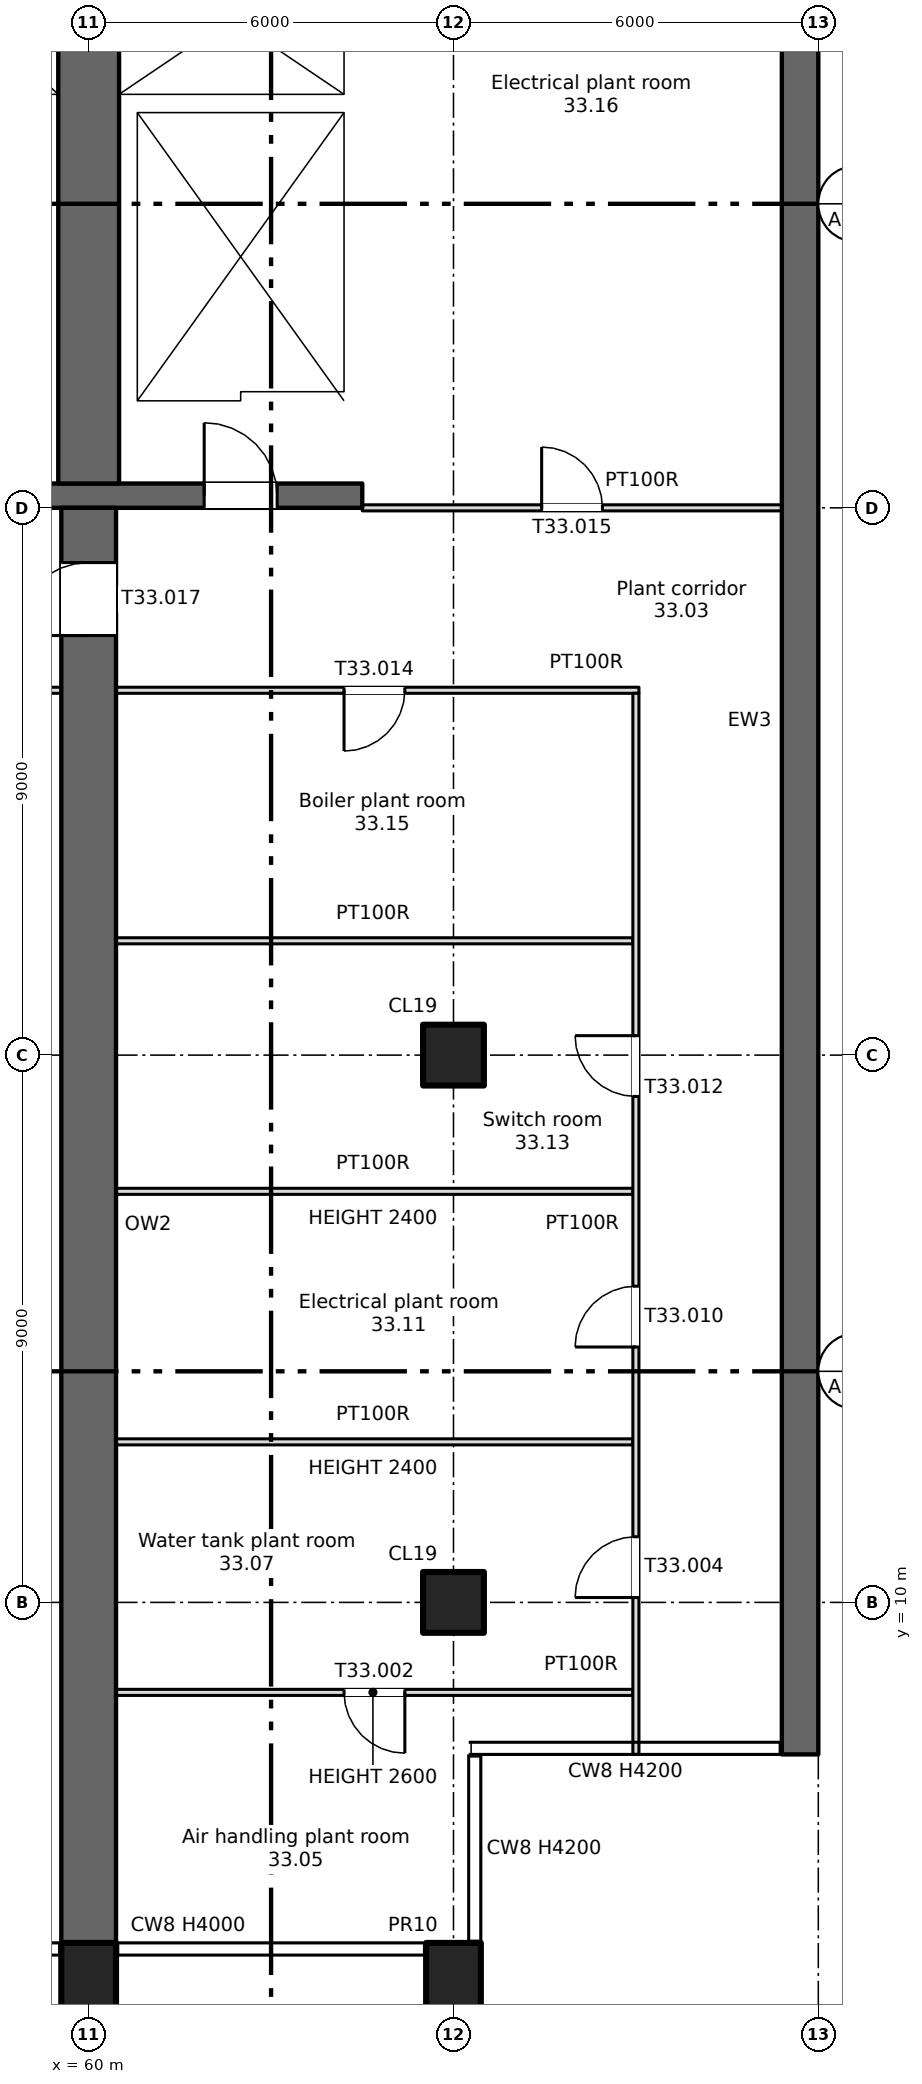
"""IFC4 building model, lengths in metres.
Left out: names, types, materials, properties, quantities, classifications, styles, units other than length and angle.
Written with IfcOpenShell. Run it as: python <this file> out.ifc"""

import sys

from ifc_helpers import new_model, si_unit, direction, frame, frame_2d, origin, origin_2d, place, context, subcontext, project, spatial, rectangle, extrude, element, fill, save


model = new_model("IFC4")
c1 = context("Model", 3, precision=1e-05, world=origin(), true_north=direction((0.0, 1.0)))
c2 = subcontext(c1, "Body", "Model", "MODEL_VIEW")
j1 = project(units=[si_unit("LENGTHUNIT", "METRE"), si_unit("PLANEANGLEUNIT", "RADIAN")], contexts=[c1])
p1 = place(None, origin())
s1 = spatial("IfcSite", under=j1, at=p1, CompositionType="ELEMENT")
p2 = place(p1, origin())
s2 = spatial("IfcBuilding", under=s1, at=p2, CompositionType="ELEMENT")
p3 = place(p2, frame((0.0, 0.0, 226.75)))
s3 = spatial("IfcBuildingStorey", under=s2, at=p3, CompositionType="ELEMENT", Elevation=226.75)
for number, where, z_axis, x_axis in (
    (1, (60.0, 3.7, -0.6), (0.0, 0.0, 1.0), (1.0, 0.0, 0.0)),
    (2, (66.0, 3.7, -0.6), (0.0, 0.0, 1.0), (1.0, 0.0, 0.0)),
):
    element("IfcColumn", number, at=place(p3, frame(where, z_axis=z_axis, x_axis=x_axis)), inside=s3, PredefinedType="COLUMN", context=c2, shape_type="SweptSolid", body=[
        extrude(rectangle(XDim=0.9, YDim=1.4, at=origin_2d()), origin(), (0.0, 0.0, 1.0), 4.8),
    ])
for number, where, z_axis, x_axis in (
    (3, (66.0, 10.0, 0.0), (0.0, 0.0, 1.0), (1.0, 0.0, 0.0)),
    (4, (66.0, 19.0, 0.0), (0.0, 0.0, 1.0), (1.0, 0.0, 0.0)),
):
    element("IfcColumn", number, at=place(p3, frame(where, z_axis=z_axis, x_axis=x_axis)), inside=s3, PredefinedType="COLUMN", context=c2, shape_type="SweptSolid", body=[
        extrude(rectangle(XDim=1.0, YDim=1.0, at=origin_2d()), origin(), (0.0, 0.0, 1.0), 4.2),
    ])
p4 = place(p3, frame((71.7, 7.5, 0.0), z_axis=(0.0, 0.0, 1.0), x_axis=(0.0, 1.0, 0.0)))
e5 = element("IfcWall", 5, at=p4, inside=s3, PredefinedType="SHEAR", context=c2, shape_type="SweptSolid", body=[
    extrude(rectangle(XDim=34.0, YDim=0.6, at=frame_2d((17.0, 0.0))), origin(), (0.0, 0.0, 1.0), 4.2),
])
p5 = place(p3, frame((60.0, 4.4, 0.0), z_axis=(0.0, 0.0, 1.0), x_axis=(0.0, 1.0, 0.0)))
e6 = element("IfcWall", 6, at=p5, inside=s3, PredefinedType="SHEAR", context=c2, shape_type="SweptSolid", body=[
    extrude(rectangle(XDim=23.6, YDim=0.9, at=frame_2d((11.8, 0.0))), origin(), (0.0, 0.0, 1.0), 4.2),
])
p6 = place(p5, frame((21.5, 0.0, 0.0)))
e7 = element("IfcOpeningElement", 7, at=p6, cuts=e6, PredefinedType="OPENING", context=c2, shape_type="SweptSolid", body=[
    extrude(rectangle(XDim=1.2, YDim=2.1, at=frame_2d((0.6, 1.05))), frame((0.0, 0.46, 0.0), z_axis=(0.0, -1.0, 0.0), x_axis=(1.0, 0.0, 0.0)), (0.0, 0.0, 1.0), 0.92),
])
p7 = place(p3, frame((6.6, 28.2, 0.0), z_axis=(0.0, 0.0, 1.0), x_axis=(1.0, 0.0, 0.0)))
e8 = element("IfcWall", 8, at=p7, inside=s3, PredefinedType="SHEAR", context=c2, shape_type="SweptSolid", body=[
    extrude(rectangle(XDim=57.9, YDim=0.4, at=frame_2d((28.95, 0.0))), origin(), (0.0, 0.0, 1.0), 4.2),
])
p8 = place(p7, frame((13.95, 0.0, 0.0)))
e9 = element("IfcOpeningElement", 9, at=p8, cuts=e8, PredefinedType="OPENING", context=c2, shape_type="SweptSolid", body=[
    extrude(rectangle(XDim=0.9, YDim=2.1, at=frame_2d((0.45, 1.05))), frame((0.0, 0.21, 0.0), z_axis=(0.0, -1.0, 0.0), x_axis=(1.0, 0.0, 0.0)), (0.0, 0.0, 1.0), 0.42),
])
p9 = place(p7, frame((49.95, 0.0, 0.0)))
e10 = element("IfcOpeningElement", 10, at=p9, cuts=e8, PredefinedType="OPENING", context=c2, shape_type="SweptSolid", body=[
    extrude(rectangle(XDim=0.9, YDim=2.1, at=frame_2d((0.45, 1.05))), frame((0.0, 0.21, 0.0), z_axis=(0.0, -1.0, 0.0), x_axis=(1.0, 0.0, 0.0)), (0.0, 0.0, 1.0), 0.42),
])
p10 = place(p7, frame((1.45, 0.0, 0.0)))
e11 = element("IfcOpeningElement", 11, at=p10, cuts=e8, PredefinedType="OPENING", context=c2, shape_type="SweptSolid", body=[
    extrude(rectangle(XDim=0.9, YDim=2.1, at=frame_2d((0.45, 1.05))), frame((0.0, 0.21, 0.0), z_axis=(0.0, -1.0, 0.0), x_axis=(1.0, 0.0, 0.0)), (0.0, 0.0, 1.0), 0.42),
])
p11 = place(p7, frame((4.8, 0.0, 0.0)))
e12 = element("IfcOpeningElement", 12, at=p11, cuts=e8, PredefinedType="OPENING", context=c2, shape_type="SweptSolid", body=[
    extrude(rectangle(XDim=1.2, YDim=2.1, at=frame_2d((0.6, 1.05))), frame((0.0, 0.21, 0.0), z_axis=(0.0, -1.0, 0.0), x_axis=(1.0, 0.0, 0.0)), (0.0, 0.0, 1.0), 0.42),
])
p12 = place(p7, frame((31.8, 0.0, 0.0)))
e13 = element("IfcOpeningElement", 13, at=p12, cuts=e8, PredefinedType="OPENING", context=c2, shape_type="SweptSolid", body=[
    extrude(rectangle(XDim=1.2, YDim=2.1, at=frame_2d((0.6, 1.05))), frame((0.0, 0.21, 0.0), z_axis=(0.0, -1.0, 0.0), x_axis=(1.0, 0.0, 0.0)), (0.0, 0.0, 1.0), 0.42),
])
p13 = place(p7, frame((55.3, 0.0, 0.0)))
e14 = element("IfcOpeningElement", 14, at=p13, cuts=e8, PredefinedType="OPENING", context=c2, shape_type="SweptSolid", body=[
    extrude(rectangle(XDim=1.2, YDim=2.1, at=frame_2d((0.6, 1.05))), frame((0.0, 0.21, 0.0), z_axis=(0.0, -1.0, 0.0), x_axis=(1.0, 0.0, 0.0)), (0.0, 0.0, 1.0), 0.42),
])
p14 = place(p7, frame((21.8, 0.0, 0.0)))
e15 = element("IfcOpeningElement", 15, at=p14, cuts=e8, PredefinedType="OPENING", context=c2, shape_type="SweptSolid", body=[
    extrude(rectangle(XDim=1.2, YDim=2.1, at=frame_2d((0.6, 1.05))), frame((0.0, 0.21, 0.0), z_axis=(0.0, -1.0, 0.0), x_axis=(1.0, 0.0, 0.0)), (0.0, 0.0, 1.0), 0.42),
])
p15 = place(p7, frame((41.8, 0.0, 0.0)))
e16 = element("IfcOpeningElement", 16, at=p15, cuts=e8, PredefinedType="OPENING", context=c2, shape_type="SweptSolid", body=[
    extrude(rectangle(XDim=1.2, YDim=2.1, at=frame_2d((0.6, 1.05))), frame((0.0, 0.21, 0.0), z_axis=(0.0, -1.0, 0.0), x_axis=(1.0, 0.0, 0.0)), (0.0, 0.0, 1.0), 0.42),
])
p16 = place(p7, frame((24.95, 0.0, 0.0)))
e17 = element("IfcOpeningElement", 17, at=p16, cuts=e8, PredefinedType="OPENING", context=c2, shape_type="SweptSolid", body=[
    extrude(rectangle(XDim=2.4, YDim=2.1, at=frame_2d((1.2, 1.05))), frame((0.0, 0.21, 0.0), z_axis=(0.0, -1.0, 0.0), x_axis=(1.0, 0.0, 0.0)), (0.0, 0.0, 1.0), 0.42),
])
p17 = place(p7, frame((37.45, 0.0, 0.0)))
e18 = element("IfcOpeningElement", 18, at=p17, cuts=e8, PredefinedType="OPENING", context=c2, shape_type="SweptSolid", body=[
    extrude(rectangle(XDim=2.4, YDim=2.1, at=frame_2d((1.2, 1.05))), frame((0.0, 0.21, 0.0), z_axis=(0.0, -1.0, 0.0), x_axis=(1.0, 0.0, 0.0)), (0.0, 0.0, 1.0), 0.42),
])
p18 = place(p7, frame((7.95, 0.0, 0.0)))
e19 = element("IfcOpeningElement", 19, at=p18, cuts=e8, PredefinedType="OPENING", context=c2, shape_type="SweptSolid", body=[
    extrude(rectangle(XDim=2.4, YDim=2.1, at=frame_2d((1.2, 1.05))), frame((0.0, 0.21, 0.0), z_axis=(0.0, -1.0, 0.0), x_axis=(1.0, 0.0, 0.0)), (0.0, 0.0, 1.0), 0.42),
])
p19 = place(p7, frame((28.95, 0.0, 0.0)))
e20 = element("IfcOpeningElement", 20, at=p19, cuts=e8, PredefinedType="OPENING", context=c2, shape_type="SweptSolid", body=[
    extrude(rectangle(XDim=0.9, YDim=2.1, at=frame_2d((0.45, 1.05))), frame((0.0, 0.21, 0.0), z_axis=(0.0, -1.0, 0.0), x_axis=(1.0, 0.0, 0.0)), (0.0, 0.0, 1.0), 0.42),
])
p20 = place(p7, frame((34.95, 0.0, 0.0)))
e21 = element("IfcOpeningElement", 21, at=p20, cuts=e8, PredefinedType="OPENING", context=c2, shape_type="SweptSolid", body=[
    extrude(rectangle(XDim=0.9, YDim=2.1, at=frame_2d((0.45, 1.05))), frame((0.0, 0.21, 0.0), z_axis=(0.0, -1.0, 0.0), x_axis=(1.0, 0.0, 0.0)), (0.0, 0.0, 1.0), 0.42),
])
p21 = place(p3, frame((64.35, 34.8, 0.0), z_axis=(0.0, 0.0, 1.0), x_axis=(0.0, 1.0, 0.0)))
e22 = element("IfcWall", 22, at=p21, inside=s3, PredefinedType="SHEAR", context=c2, shape_type="SweptSolid", body=[
    extrude(rectangle(XDim=10.5, YDim=0.3, at=frame_2d((5.25, 0.0))), origin(), (0.0, 0.0, 1.0), 4.2),
])
p22 = place(p3, frame((60.0, 28.4, 0.0), z_axis=(0.0, 0.0, 1.0), x_axis=(0.0, 1.0, 0.0)))
e23 = element("IfcWall", 23, at=p22, inside=s3, PredefinedType="SHEAR", context=c2, shape_type="SweptSolid", body=[
    extrude(rectangle(XDim=16.9, YDim=1.0, at=frame_2d((8.45, 0.0))), origin(), (0.0, 0.0, 1.0), 4.2),
])
p23 = place(p22, frame((9.6, 0.0, 0.0)))
e24 = element("IfcOpeningElement", 24, at=p23, cuts=e23, PredefinedType="OPENING", context=c2, shape_type="SweptSolid", body=[
    extrude(rectangle(XDim=2.0, YDim=2.1, at=frame_2d((1.0, 1.05))), frame((0.0, 0.51, 0.0), z_axis=(0.0, -1.0, 0.0), x_axis=(1.0, 0.0, 0.0)), (0.0, 0.0, 1.0), 1.02),
])
p24 = place(p22, frame((15.4, 0.0, 0.0)))
e25 = element("IfcOpeningElement", 25, at=p24, cuts=e23, PredefinedType="OPENING", context=c2, shape_type="SweptSolid", body=[
    extrude(rectangle(XDim=1.2, YDim=2.1, at=frame_2d((0.6, 1.05))), frame((0.0, 0.51, 0.0), z_axis=(0.0, -1.0, 0.0), x_axis=(1.0, 0.0, 0.0)), (0.0, 0.0, 1.0), 1.02),
])
for number, where, z_axis, x_axis in (
    (26, (60.65, 28.4, 0.0), (0.0, 0.0, 1.0), (0.0, 1.0, 0.0)),
    (27, (64.35, 28.4, 0.0), (0.0, 0.0, 1.0), (0.0, 1.0, 0.0)),
):
    element("IfcWall", number, at=place(p3, frame(where, z_axis=z_axis, x_axis=x_axis)), inside=s3, PredefinedType="SHEAR", context=c2, shape_type="SweptSolid", body=[
        extrude(rectangle(XDim=6.1, YDim=0.3, at=frame_2d((3.05, 0.0))), origin(), (0.0, 0.0, 1.0), 4.2),
    ])
p25 = place(p3, frame((47.3, 34.65, 0.0), z_axis=(0.0, 0.0, 1.0), x_axis=(1.0, 0.0, 0.0)))
e28 = element("IfcWall", 28, at=p25, inside=s3, PredefinedType="SHEAR", context=c2, shape_type="SweptSolid", body=[
    extrude(rectangle(XDim=12.2, YDim=0.3, at=frame_2d((6.1, 0.0))), origin(), (0.0, 0.0, 1.0), 4.2),
])
p26 = place(p25, frame((1.3, 0.0, 0.0)))
e29 = element("IfcOpeningElement", 29, at=p26, cuts=e28, PredefinedType="OPENING", context=c2, shape_type="SweptSolid", body=[
    extrude(rectangle(XDim=1.1, YDim=2.1, at=frame_2d((0.55, 1.05))), frame((0.0, 0.16, 0.0), z_axis=(0.0, -1.0, 0.0), x_axis=(1.0, 0.0, 0.0)), (0.0, 0.0, 1.0), 0.32),
])
p27 = place(p3, frame((60.5, 34.65, 0.0), z_axis=(0.0, 0.0, 1.0), x_axis=(1.0, 0.0, 0.0)))
e30 = element("IfcWall", 30, at=p27, inside=s3, PredefinedType="SHEAR", context=c2, shape_type="SweptSolid", body=[
    extrude(rectangle(XDim=4.0, YDim=0.3, at=frame_2d((2.0, 0.0))), origin(), (0.0, 0.0, 1.0), 4.2),
])
p28 = place(p3, frame((60.4, 8.52, 0.0), z_axis=(0.0, 0.0, 1.0), x_axis=(1.0, 0.0, 0.0)))
e31 = element("IfcWall", 31, at=p28, inside=s3, PredefinedType="PARTITIONING", context=c2, shape_type="SweptSolid", body=[
    extrude(rectangle(XDim=8.55, YDim=0.1, at=frame_2d((4.275, 0.0))), origin(), (0.0, 0.0, 1.0), 2.6),
])
p29 = place(p28, frame((3.8, 0.0, 0.0)))
e32 = element("IfcOpeningElement", 32, at=p29, cuts=e31, PredefinedType="OPENING", context=c2, shape_type="SweptSolid", body=[
    extrude(rectangle(XDim=1.0, YDim=2.1, at=frame_2d((0.5, 1.05))), frame((0.0, 0.06, 0.0), z_axis=(0.0, -1.0, 0.0), x_axis=(1.0, 0.0, 0.0)), (0.0, 0.0, 1.0), 0.12),
])
for number, where, z_axis, x_axis in (
    (33, (60.4, 12.64, 0.0), (0.0, 0.0, 1.0), (1.0, 0.0, 0.0)),
    (34, (60.4, 16.76, 0.0), (0.0, 0.0, 1.0), (1.0, 0.0, 0.0)),
):
    element("IfcWall", number, at=place(p3, frame(where, z_axis=z_axis, x_axis=x_axis)), inside=s3, PredefinedType="PARTITIONING", context=c2, shape_type="SweptSolid", body=[
        extrude(rectangle(XDim=8.55, YDim=0.1, at=frame_2d((4.275, 0.0))), origin(), (0.0, 0.0, 1.0), 2.4),
    ])
p30 = place(p3, frame((60.4, 20.88, 0.0), z_axis=(0.0, 0.0, 1.0), x_axis=(1.0, 0.0, 0.0)))
e35 = element("IfcWall", 35, at=p30, inside=s3, PredefinedType="PARTITIONING", context=c2, shape_type="SweptSolid", body=[
    extrude(rectangle(XDim=8.55, YDim=0.1, at=frame_2d((4.275, 0.0))), origin(), (0.0, 0.0, 1.0), 4.2),
])
p31 = place(p3, frame((46.95, 25.0, 0.0), z_axis=(0.0, 0.0, 1.0), x_axis=(1.0, 0.0, 0.0)))
e36 = element("IfcWall", 36, at=p31, inside=s3, PredefinedType="PARTITIONING", context=c2, shape_type="SweptSolid", body=[
    extrude(rectangle(XDim=12.65, YDim=0.1, at=frame_2d((6.325, 0.0))), origin(), (0.0, 0.0, 1.0), 4.2),
])
p32 = place(p3, frame((60.4, 25.0, 0.0), z_axis=(0.0, 0.0, 1.0), x_axis=(1.0, 0.0, 0.0)))
e37 = element("IfcWall", 37, at=p32, inside=s3, PredefinedType="PARTITIONING", context=c2, shape_type="SweptSolid", body=[
    extrude(rectangle(XDim=8.65, YDim=0.1, at=frame_2d((4.325, 0.0))), origin(), (0.0, 0.0, 1.0), 4.2),
])
p33 = place(p32, frame((3.8, 0.0, 0.0)))
e38 = element("IfcOpeningElement", 38, at=p33, cuts=e37, PredefinedType="OPENING", context=c2, shape_type="SweptSolid", body=[
    extrude(rectangle(XDim=1.0, YDim=2.1, at=frame_2d((0.5, 1.05))), frame((0.0, 0.06, 0.0), z_axis=(0.0, -1.0, 0.0), x_axis=(1.0, 0.0, 0.0)), (0.0, 0.0, 1.0), 0.12),
])
p34 = place(p3, frame((64.5, 28.0, 0.0), z_axis=(0.0, 0.0, 1.0), x_axis=(1.0, 0.0, 0.0)))
e39 = element("IfcWall", 39, at=p34, inside=s3, PredefinedType="PARTITIONING", context=c2, shape_type="SweptSolid", body=[
    extrude(rectangle(XDim=6.9, YDim=0.1, at=frame_2d((3.45, 0.0))), origin(), (0.0, 0.0, 1.0), 4.2),
])
p35 = place(p34, frame((2.95, 0.0, 0.0)))
e40 = element("IfcOpeningElement", 40, at=p35, cuts=e39, PredefinedType="OPENING", context=c2, shape_type="SweptSolid", body=[
    extrude(rectangle(XDim=1.0, YDim=2.1, at=frame_2d((0.5, 1.05))), frame((0.0, 0.06, 0.0), z_axis=(0.0, -1.0, 0.0), x_axis=(1.0, 0.0, 0.0)), (0.0, 0.0, 1.0), 0.12),
])
p36 = place(p3, frame((69.0, 7.5, 0.0), z_axis=(0.0, 0.0, 1.0), x_axis=(0.0, 1.0, 0.0)))
e41 = element("IfcWall", 41, at=p36, inside=s3, PredefinedType="PARTITIONING", context=c2, shape_type="SweptSolid", body=[
    extrude(rectangle(XDim=17.45, YDim=0.1, at=frame_2d((8.725, 0.0))), origin(), (0.0, 0.0, 1.0), 4.2),
])
p37 = place(p36, frame((2.58, 0.0, 0.0)))
e42 = element("IfcOpeningElement", 42, at=p37, cuts=e41, PredefinedType="OPENING", context=c2, shape_type="SweptSolid", body=[
    extrude(rectangle(XDim=1.0, YDim=2.1, at=frame_2d((0.5, 1.05))), frame((0.0, 0.06, 0.0), z_axis=(0.0, -1.0, 0.0), x_axis=(1.0, 0.0, 0.0)), (0.0, 0.0, 1.0), 0.12),
])
p38 = place(p36, frame((6.7, 0.0, 0.0)))
e43 = element("IfcOpeningElement", 43, at=p38, cuts=e41, PredefinedType="OPENING", context=c2, shape_type="SweptSolid", body=[
    extrude(rectangle(XDim=1.0, YDim=2.1, at=frame_2d((0.5, 1.05))), frame((0.0, 0.06, 0.0), z_axis=(0.0, -1.0, 0.0), x_axis=(1.0, 0.0, 0.0)), (0.0, 0.0, 1.0), 0.12),
])
p39 = place(p36, frame((10.82, 0.0, 0.0)))
e44 = element("IfcOpeningElement", 44, at=p39, cuts=e41, PredefinedType="OPENING", context=c2, shape_type="SweptSolid", body=[
    extrude(rectangle(XDim=1.0, YDim=2.1, at=frame_2d((0.5, 1.05))), frame((0.0, 0.06, 0.0), z_axis=(0.0, -1.0, 0.0), x_axis=(1.0, 0.0, 0.0)), (0.0, 0.0, 1.0), 0.12),
])
p40 = place(p13, origin())
e45 = element("IfcDoor", 45, at=p40, inside=s3, OperationType="SINGLE_SWING_LEFT", PredefinedType="DOOR", context=c2, shape_type="SweptSolid", body=[
    extrude(rectangle(XDim=1.2, YDim=2.1, at=frame_2d((0.6, 1.05))), frame((0.0, 0.025, 0.0), z_axis=(0.0, -1.0, 0.0), x_axis=(1.0, 0.0, 0.0)), (0.0, 0.0, 1.0), 0.05),
])
fill(e14, e45)
p41 = place(p29, origin())
e46 = element("IfcDoor", 46, at=p41, inside=s3, OperationType="SINGLE_SWING_RIGHT", PredefinedType="DOOR", context=c2, shape_type="SweptSolid", body=[
    extrude(rectangle(XDim=1.0, YDim=2.1, at=frame_2d((0.5, 1.05))), frame((0.0, 0.025, 0.0), z_axis=(0.0, -1.0, 0.0), x_axis=(1.0, 0.0, 0.0)), (0.0, 0.0, 1.0), 0.05),
])
fill(e32, e46)
p42 = place(p37, origin())
e47 = element("IfcDoor", 47, at=p42, inside=s3, OperationType="SINGLE_SWING_LEFT", PredefinedType="DOOR", context=c2, shape_type="SweptSolid", body=[
    extrude(rectangle(XDim=1.0, YDim=2.1, at=frame_2d((0.5, 1.05))), frame((0.0, 0.025, 0.0), z_axis=(0.0, -1.0, 0.0), x_axis=(1.0, 0.0, 0.0)), (0.0, 0.0, 1.0), 0.05),
])
fill(e42, e47)
p43 = place(p38, origin())
e48 = element("IfcDoor", 48, at=p43, inside=s3, OperationType="SINGLE_SWING_LEFT", PredefinedType="DOOR", context=c2, shape_type="SweptSolid", body=[
    extrude(rectangle(XDim=1.0, YDim=2.1, at=frame_2d((0.5, 1.05))), frame((0.0, 0.025, 0.0), z_axis=(0.0, -1.0, 0.0), x_axis=(1.0, 0.0, 0.0)), (0.0, 0.0, 1.0), 0.05),
])
fill(e43, e48)
p44 = place(p39, origin())
e49 = element("IfcDoor", 49, at=p44, inside=s3, OperationType="SINGLE_SWING_RIGHT", PredefinedType="DOOR", context=c2, shape_type="SweptSolid", body=[
    extrude(rectangle(XDim=1.0, YDim=2.1, at=frame_2d((0.5, 1.05))), frame((0.0, 0.025, 0.0), z_axis=(0.0, -1.0, 0.0), x_axis=(1.0, 0.0, 0.0)), (0.0, 0.0, 1.0), 0.05),
])
fill(e44, e49)
p45 = place(p33, origin())
e50 = element("IfcDoor", 50, at=p45, inside=s3, OperationType="SINGLE_SWING_LEFT", PredefinedType="DOOR", context=c2, shape_type="SweptSolid", body=[
    extrude(rectangle(XDim=1.0, YDim=2.1, at=frame_2d((0.5, 1.05))), frame((0.0, 0.025, 0.0), z_axis=(0.0, -1.0, 0.0), x_axis=(1.0, 0.0, 0.0)), (0.0, 0.0, 1.0), 0.05),
])
fill(e38, e50)
p46 = place(p35, origin())
e51 = element("IfcDoor", 51, at=p46, inside=s3, OperationType="SINGLE_SWING_LEFT", PredefinedType="DOOR", context=c2, shape_type="SweptSolid", body=[
    extrude(rectangle(XDim=1.0, YDim=2.1, at=frame_2d((0.5, 1.05))), frame((0.0, 0.025, 0.0), z_axis=(0.0, -1.0, 0.0), x_axis=(1.0, 0.0, 0.0)), (0.0, 0.0, 1.0), 0.05),
])
fill(e40, e51)
p47 = place(p6, origin())
e52 = element("IfcDoor", 52, at=p47, inside=s3, OperationType="SINGLE_SWING_LEFT", PredefinedType="DOOR", context=c2, shape_type="SweptSolid", body=[
    extrude(rectangle(XDim=1.2, YDim=2.1, at=frame_2d((0.6, 1.05))), frame((0.0, 0.025, 0.0), z_axis=(0.0, -1.0, 0.0), x_axis=(1.0, 0.0, 0.0)), (0.0, 0.0, 1.0), 0.05),
])
fill(e7, e52)
save(model, sys.argv[1])
